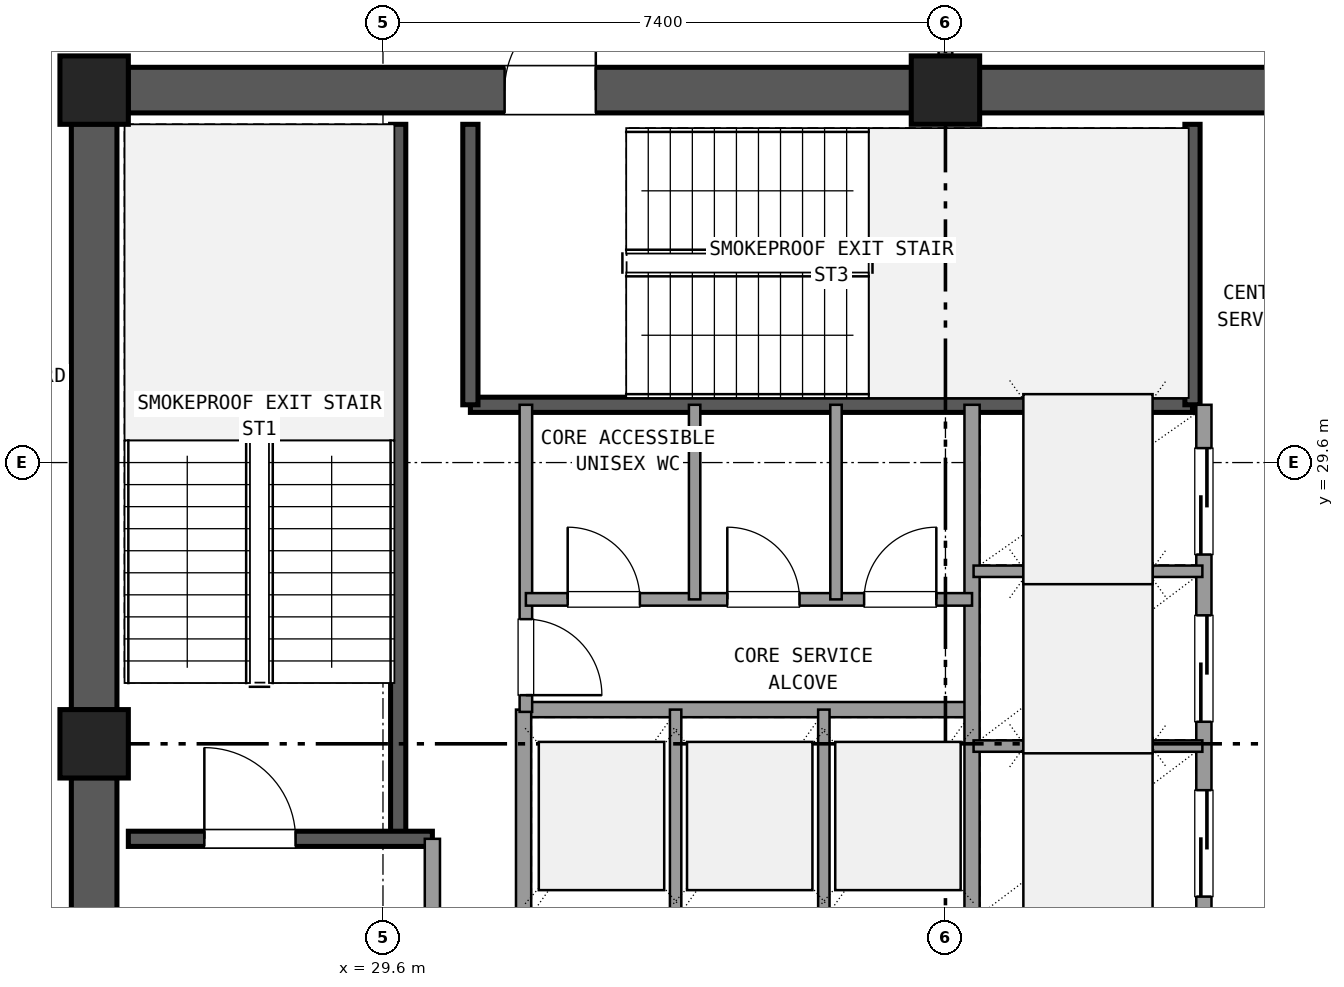
"""IFC4 building model, lengths in metres.
Left out: names, types, materials, properties, quantities, classifications, styles, units other than length and angle.
Written with IfcOpenShell. Run it as: python <this file> out.ifc"""

import sys

from ifc_helpers import new_model, si_unit, direction, frame, frame_2d, origin, origin_2d, place, context, subcontext, project, spatial, rectangle, extrude, element, fill, save


model = new_model("IFC4")
c1 = context("Model", 3, precision=1e-05, world=origin(), true_north=direction((0.0, 1.0)))
c2 = subcontext(c1, "Body", "Model", "MODEL_VIEW")
j1 = project(units=[si_unit("LENGTHUNIT", "METRE"), si_unit("PLANEANGLEUNIT", "RADIAN")], contexts=[c1])
p1 = place(None, origin())
s1 = spatial("IfcSite", under=j1, at=p1, CompositionType="ELEMENT")
p2 = place(p1, origin())
s2 = spatial("IfcBuilding", under=s1, at=p2, CompositionType="ELEMENT")
p3 = place(p2, frame((0.0, 0.0, 188.46)))
s3 = spatial("IfcBuildingStorey", under=s2, at=p3, CompositionType="ELEMENT", Elevation=188.46)
for number, where, z_axis, x_axis in (
    (1, (37.0, 34.5, 0.0), (0.0, 0.0, 1.0), (1.0, 0.0, 0.0)),
    (2, (25.8, 34.5, 0.0), (0.0, 0.0, 1.0), (1.0, 0.0, 0.0)),
    (3, (25.8, 25.9, 0.0), (0.0, 0.0, 1.0), (1.0, 0.0, 0.0)),
):
    element("IfcColumn", number, at=place(p3, frame(where, z_axis=z_axis, x_axis=x_axis)), inside=s3, PredefinedType="COLUMN", context=c2, shape_type="SweptSolid", body=[
        extrude(rectangle(XDim=0.9, YDim=0.9, at=origin_2d()), origin(), (0.0, 0.0, 1.0), 4.32),
    ])
p4 = place(p3, frame((47.755, 34.5, 0.0), z_axis=(0.0, 0.0, 1.0), x_axis=(-1.0, 0.0, 0.0)))
e4 = element("IfcWall", 4, at=p4, inside=s3, PredefinedType="SHEAR", context=c2, shape_type="SweptSolid", body=[
    extrude(rectangle(XDim=10.31, YDim=0.6, at=frame_2d((5.155, 0.0))), origin(), (0.0, 0.0, 1.0), 4.04),
])
p5 = place(p4, frame((4.655, 0.0, 0.0)))
e5 = element("IfcOpeningElement", 5, at=p5, cuts=e4, PredefinedType="OPENING", context=c2, shape_type="SweptSolid", body=[
    extrude(rectangle(XDim=1.6, YDim=2.2, at=frame_2d((0.8, 1.1))), frame((0.0, 0.31, 0.0), z_axis=(0.0, -1.0, 0.0), x_axis=(1.0, 0.0, 0.0)), (0.0, 0.0, 1.0), 0.62),
])
p6 = place(p3, frame((36.555, 34.5, 0.0), z_axis=(0.0, 0.0, 1.0), x_axis=(-1.0, 0.0, 0.0)))
e6 = element("IfcWall", 6, at=p6, inside=s3, PredefinedType="SHEAR", context=c2, shape_type="SweptSolid", body=[
    extrude(rectangle(XDim=10.31, YDim=0.6, at=frame_2d((5.155, 0.0))), origin(), (0.0, 0.0, 1.0), 4.04),
])
p7 = place(p6, frame((4.155, 0.0, 0.0)))
e7 = element("IfcOpeningElement", 7, at=p7, cuts=e6, PredefinedType="OPENING", context=c2, shape_type="SweptSolid", body=[
    extrude(rectangle(XDim=1.2, YDim=2.15, at=frame_2d((0.6, 1.075))), frame((0.0, 0.31, 0.0), z_axis=(0.0, -1.0, 0.0), x_axis=(1.0, 0.0, 0.0)), (0.0, 0.0, 1.0), 0.62),
])
p8 = place(p3, frame((25.8, 34.055, 0.0), z_axis=(0.0, 0.0, 1.0), x_axis=(0.0, -1.0, 0.0)))
e8 = element("IfcWall", 8, at=p8, inside=s3, PredefinedType="SHEAR", context=c2, shape_type="SweptSolid", body=[
    extrude(rectangle(XDim=7.71, YDim=0.6, at=frame_2d((3.855, 0.0))), origin(), (0.0, 0.0, 1.0), 4.04),
])
p9 = place(p3, frame((25.8, 25.455, 0.0), z_axis=(0.0, 0.0, 1.0), x_axis=(0.0, -1.0, 0.0)))
e9 = element("IfcWall", 9, at=p9, inside=s3, PredefinedType="SHEAR", context=c2, shape_type="SweptSolid", body=[
    extrude(rectangle(XDim=7.71, YDim=0.6, at=frame_2d((3.855, 0.0))), origin(), (0.0, 0.0, 1.0), 4.04),
])
p10 = place(p9, frame((2.205, 0.0, 0.0)))
e10 = element("IfcOpeningElement", 10, at=p10, cuts=e9, PredefinedType="OPENING", context=c2, shape_type="SweptSolid", body=[
    extrude(rectangle(XDim=1.2, YDim=2.15, at=frame_2d((0.6, 1.075))), frame((0.0, 0.31, 0.0), z_axis=(0.0, -1.0, 0.0), x_axis=(1.0, 0.0, 0.0)), (0.0, 0.0, 1.0), 0.62),
])
p11 = place(p3, frame((29.8, 24.65, 0.0), z_axis=(0.0, 0.0, 1.0), x_axis=(0.0, 1.0, 0.0)))
e11 = element("IfcWall", 11, at=p11, inside=s3, PredefinedType="SHEAR", context=c2, shape_type="SweptSolid", body=[
    extrude(rectangle(XDim=9.4, YDim=0.2, at=frame_2d((4.7, 0.0))), origin(), (0.0, 0.0, 1.0), 4.04),
])
p12 = place(p3, frame((26.25, 24.65, 0.0), z_axis=(0.0, 0.0, 1.0), x_axis=(1.0, 0.0, 0.0)))
e12 = element("IfcWall", 12, at=p12, inside=s3, PredefinedType="SHEAR", context=c2, shape_type="SweptSolid", body=[
    extrude(rectangle(XDim=4.0, YDim=0.2, at=frame_2d((2.0, 0.0))), origin(), (0.0, 0.0, 1.0), 4.04),
])
p13 = place(p12, frame((1.0, 0.0, 0.0)))
e13 = element("IfcOpeningElement", 13, at=p13, cuts=e12, PredefinedType="OPENING", context=c2, shape_type="SweptSolid", body=[
    extrude(rectangle(XDim=1.2, YDim=2.15, at=frame_2d((0.6, 1.075))), frame((0.0, 0.11, 0.0), z_axis=(0.0, -1.0, 0.0), x_axis=(1.0, 0.0, 0.0)), (0.0, 0.0, 1.0), 0.22),
])
p14 = place(p3, frame((30.75, 30.36, 0.0), z_axis=(0.0, 0.0, 1.0), x_axis=(1.0, 0.0, 0.0)))
e14 = element("IfcWall", 14, at=p14, inside=s3, PredefinedType="SHEAR", context=c2, shape_type="SweptSolid", body=[
    extrude(rectangle(XDim=9.5, YDim=0.2, at=frame_2d((4.75, 0.0))), origin(), (0.0, 0.0, 1.0), 4.04),
])
for number, where, z_axis, x_axis in (
    (15, (30.75, 30.36, 0.0), (0.0, 0.0, 1.0), (0.0, 1.0, 0.0)),
    (16, (40.25, 30.36, 0.0), (0.0, 0.0, 1.0), (0.0, 1.0, 0.0)),
):
    element("IfcWall", number, at=place(p3, frame(where, z_axis=z_axis, x_axis=x_axis)), inside=s3, PredefinedType="SHEAR", context=c2, shape_type="SweptSolid", body=[
        extrude(rectangle(XDim=3.69, YDim=0.2, at=frame_2d((1.845, 0.0))), origin(), (0.0, 0.0, 1.0), 4.04),
    ])
p15 = place(p3, frame((30.25, 17.75, 0.0), z_axis=(0.0, 0.0, 1.0), x_axis=(0.0, 1.0, 0.0)))
e17 = element("IfcWall", 17, at=p15, inside=s3, PredefinedType="SOLIDWALL", context=c2, shape_type="SweptSolid", body=[
    extrude(rectangle(XDim=6.9, YDim=0.2, at=frame_2d((3.45, 0.0))), origin(), (0.0, 0.0, 1.0), 2.95),
])
p16 = place(p15, frame((4.15, 0.0, 0.0)))
e18 = element("IfcOpeningElement", 18, at=p16, cuts=e17, PredefinedType="OPENING", context=c2, shape_type="SweptSolid", body=[
    extrude(rectangle(XDim=1.2, YDim=2.15, at=frame_2d((0.6, 1.075))), frame((0.0, 0.11, 0.0), z_axis=(0.0, -1.0, 0.0), x_axis=(1.0, 0.0, 0.0)), (0.0, 0.0, 1.0), 0.22),
])
p17 = place(p3, frame((31.45, 26.35, 0.0), z_axis=(0.0, 0.0, 1.0), x_axis=(1.0, 0.0, 0.0)))
e19 = element("IfcWall", 19, at=p17, inside=s3, PredefinedType="SOLIDWALL", context=c2, shape_type="SweptSolid", body=[
    extrude(rectangle(XDim=5.9, YDim=0.2, at=frame_2d((2.95, 0.0))), origin(), (0.0, 0.0, 1.0), 2.95),
])
p18 = place(p3, frame((31.45, 23.54, 0.0), z_axis=(0.0, 0.0, 1.0), x_axis=(0.0, 1.0, 0.0)))
e20 = element("IfcWall", 20, at=p18, inside=s3, PredefinedType="SOLIDWALL", context=c2, shape_type="SweptSolid", body=[
    extrude(rectangle(XDim=2.81, YDim=0.2, at=frame_2d((1.405, 0.0))), origin(), (0.0, 0.0, 1.0), 2.95),
])
for number, where, z_axis, x_axis in (
    (21, (33.45, 23.54, 0.0), (0.0, 0.0, 1.0), (0.0, 1.0, 0.0)),
    (22, (35.4, 23.54, 0.0), (0.0, 0.0, 1.0), (0.0, 1.0, 0.0)),
):
    element("IfcWall", number, at=place(p3, frame(where, z_axis=z_axis, x_axis=x_axis)), inside=s3, PredefinedType="PARTITIONING", context=c2, shape_type="SweptSolid", body=[
        extrude(rectangle(XDim=2.81, YDim=0.15, at=frame_2d((1.405, 0.0))), origin(), (0.0, 0.0, 1.0), 2.95),
    ])
p19 = place(p3, frame((37.35, 23.54, 0.0), z_axis=(0.0, 0.0, 1.0), x_axis=(0.0, 1.0, 0.0)))
e23 = element("IfcWall", 23, at=p19, inside=s3, PredefinedType="SOLIDWALL", context=c2, shape_type="SweptSolid", body=[
    extrude(rectangle(XDim=6.82, YDim=0.2, at=frame_2d((3.41, 0.0))), origin(), (0.0, 0.0, 1.0), 2.95),
])
p20 = place(p3, frame((40.4, 23.54, 0.0), z_axis=(0.0, 0.0, 1.0), x_axis=(0.0, 1.0, 0.0)))
e24 = element("IfcWall", 24, at=p20, inside=s3, PredefinedType="SOLIDWALL", context=c2, shape_type="SweptSolid", body=[
    extrude(rectangle(XDim=6.82, YDim=0.2, at=frame_2d((3.41, 0.0))), origin(), (0.0, 0.0, 1.0), 2.95),
])
p21 = place(p20, frame((0.35, 0.0, 0.0)))
e25 = element("IfcOpeningElement", 25, at=p21, cuts=e24, PredefinedType="OPENING", context=c2, shape_type="SweptSolid", body=[
    extrude(rectangle(XDim=1.4, YDim=2.2, at=frame_2d((0.7, 1.1))), frame((0.0, 0.11, 0.0), z_axis=(0.0, -1.0, 0.0), x_axis=(1.0, 0.0, 0.0)), (0.0, 0.0, 1.0), 0.22),
])
p22 = place(p20, frame((2.65, 0.0, 0.0)))
e26 = element("IfcOpeningElement", 26, at=p22, cuts=e24, PredefinedType="OPENING", context=c2, shape_type="SweptSolid", body=[
    extrude(rectangle(XDim=1.4, YDim=2.2, at=frame_2d((0.7, 1.1))), frame((0.0, 0.11, 0.0), z_axis=(0.0, -1.0, 0.0), x_axis=(1.0, 0.0, 0.0)), (0.0, 0.0, 1.0), 0.22),
])
p23 = place(p20, frame((4.85, 0.0, 0.0)))
e27 = element("IfcOpeningElement", 27, at=p23, cuts=e24, PredefinedType="OPENING", context=c2, shape_type="SweptSolid", body=[
    extrude(rectangle(XDim=1.4, YDim=2.2, at=frame_2d((0.7, 1.1))), frame((0.0, 0.11, 0.0), z_axis=(0.0, -1.0, 0.0), x_axis=(1.0, 0.0, 0.0)), (0.0, 0.0, 1.0), 0.22),
])
for number, where, z_axis, x_axis in (
    (28, (37.37, 25.87, 0.0), (0.0, 0.0, 1.0), (1.0, 0.0, 0.0)),
    (29, (37.37, 28.17, 0.0), (0.0, 0.0, 1.0), (1.0, 0.0, 0.0)),
):
    element("IfcWall", number, at=place(p3, frame(where, z_axis=z_axis, x_axis=x_axis)), inside=s3, PredefinedType="PARTITIONING", context=c2, shape_type="SweptSolid", body=[
        extrude(rectangle(XDim=3.01, YDim=0.15, at=frame_2d((1.505, 0.0))), origin(), (0.0, 0.0, 1.0), 2.95),
    ])
p24 = place(p3, frame((31.48, 26.32, 0.0), z_axis=(0.0, 0.0, 1.0), x_axis=(0.0, 1.0, 0.0)))
e30 = element("IfcWall", 30, at=p24, inside=s3, PredefinedType="PLUMBINGWALL", context=c2, shape_type="SweptSolid", body=[
    extrude(rectangle(XDim=4.04, YDim=0.165, at=frame_2d((2.02, 0.0))), origin(), (0.0, 0.0, 1.0), 2.95),
])
p25 = place(p24, frame((0.22, 0.0, 0.0)))
e31 = element("IfcOpeningElement", 31, at=p25, cuts=e30, PredefinedType="OPENING", context=c2, shape_type="SweptSolid", body=[
    extrude(rectangle(XDim=1.0, YDim=2.15, at=frame_2d((0.5, 1.075))), frame((0.0, 0.093, 0.0), z_axis=(0.0, -1.0, 0.0), x_axis=(1.0, 0.0, 0.0)), (0.0, 0.0, 1.0), 0.185),
])
p26 = place(p3, frame((31.48, 27.8, 0.0), z_axis=(0.0, 0.0, 1.0), x_axis=(1.0, 0.0, 0.0)))
e32 = element("IfcWall", 32, at=p26, inside=s3, PredefinedType="PLUMBINGWALL", context=c2, shape_type="SweptSolid", body=[
    extrude(rectangle(XDim=5.87, YDim=0.165, at=frame_2d((2.935, 0.0))), origin(), (0.0, 0.0, 1.0), 2.95),
])
p27 = place(p26, frame((0.55, 0.0, 0.0)))
e33 = element("IfcOpeningElement", 33, at=p27, cuts=e32, PredefinedType="OPENING", context=c2, shape_type="SweptSolid", body=[
    extrude(rectangle(XDim=0.95, YDim=2.1, at=frame_2d((0.475, 1.05))), frame((0.0, 0.093, 0.0), z_axis=(0.0, -1.0, 0.0), x_axis=(1.0, 0.0, 0.0)), (0.0, 0.0, 1.0), 0.185),
])
p28 = place(p26, frame((2.65, 0.0, 0.0)))
e34 = element("IfcOpeningElement", 34, at=p28, cuts=e32, PredefinedType="OPENING", context=c2, shape_type="SweptSolid", body=[
    extrude(rectangle(XDim=0.95, YDim=2.1, at=frame_2d((0.475, 1.05))), frame((0.0, 0.093, 0.0), z_axis=(0.0, -1.0, 0.0), x_axis=(1.0, 0.0, 0.0)), (0.0, 0.0, 1.0), 0.185),
])
p29 = place(p26, frame((4.45, 0.0, 0.0)))
e35 = element("IfcOpeningElement", 35, at=p29, cuts=e32, PredefinedType="OPENING", context=c2, shape_type="SweptSolid", body=[
    extrude(rectangle(XDim=0.95, YDim=2.1, at=frame_2d((0.475, 1.05))), frame((0.0, 0.093, 0.0), z_axis=(0.0, -1.0, 0.0), x_axis=(1.0, 0.0, 0.0)), (0.0, 0.0, 1.0), 0.185),
])
for number, where, z_axis, x_axis in (
    (36, (33.7, 27.8, 0.0), (0.0, 0.0, 1.0), (0.0, 1.0, 0.0)),
    (37, (35.56, 27.8, 0.0), (0.0, 0.0, 1.0), (0.0, 1.0, 0.0)),
):
    element("IfcWall", number, at=place(p3, frame(where, z_axis=z_axis, x_axis=x_axis)), inside=s3, PredefinedType="PARTITIONING", context=c2, shape_type="SweptSolid", body=[
        extrude(rectangle(XDim=2.56, YDim=0.15, at=frame_2d((1.28, 0.0))), origin(), (0.0, 0.0, 1.0), 2.95),
    ])
p30 = place(p3, frame((37.0, 34.95, 0.0), z_axis=(0.0, 0.0, 1.0), x_axis=(0.0, 1.0, 0.0)))
e38 = element("IfcWall", 38, at=p30, inside=s3, PredefinedType="PARTITIONING", context=c2, shape_type="SweptSolid", body=[
    extrude(rectangle(XDim=2.7, YDim=0.18, at=frame_2d((1.35, 0.0))), origin(), (0.0, 0.0, 1.0), 2.95),
])
p31 = place(p30, frame((0.35, 0.0, 0.0)))
e39 = element("IfcOpeningElement", 39, at=p31, cuts=e38, PredefinedType="OPENING", context=c2, shape_type="SweptSolid", body=[
    extrude(rectangle(XDim=2.0, YDim=2.2, at=frame_2d((1.0, 1.1))), frame((0.0, 0.1, 0.0), z_axis=(0.0, -1.0, 0.0), x_axis=(1.0, 0.0, 0.0)), (0.0, 0.0, 1.0), 0.2),
])
p32 = place(p13, origin())
e40 = element("IfcDoor", 40, at=p32, inside=s3, OperationType="SINGLE_SWING_LEFT", PredefinedType="DOOR", context=c2, shape_type="SweptSolid", body=[
    extrude(rectangle(XDim=1.2, YDim=2.15, at=frame_2d((0.6, 1.075))), frame((0.0, 0.025, 0.0), z_axis=(0.0, -1.0, 0.0), x_axis=(1.0, 0.0, 0.0)), (0.0, 0.0, 1.0), 0.05),
])
fill(e13, e40)
p33 = place(p7, frame((1.2, 0.0, 0.0), z_axis=(0.0, 0.0, 1.0), x_axis=(-1.0, 0.0, 0.0)))
e41 = element("IfcDoor", 41, at=p33, inside=s3, OperationType="SINGLE_SWING_LEFT", PredefinedType="DOOR", context=c2, shape_type="SweptSolid", body=[
    extrude(rectangle(XDim=1.2, YDim=2.15, at=frame_2d((0.6, 1.075))), frame((0.0, 0.025, 0.0), z_axis=(0.0, -1.0, 0.0), x_axis=(1.0, 0.0, 0.0)), (0.0, 0.0, 1.0), 0.05),
])
fill(e7, e41)
p34 = place(p21, origin())
e42 = element("IfcDoor", 42, at=p34, inside=s3, OperationType="SLIDING_TO_LEFT", PredefinedType="DOOR", context=c2, shape_type="SweptSolid", body=[
    extrude(rectangle(XDim=1.4, YDim=2.2, at=frame_2d((0.7, 1.1))), frame((0.0, 0.025, 0.0), z_axis=(0.0, -1.0, 0.0), x_axis=(1.0, 0.0, 0.0)), (0.0, 0.0, 1.0), 0.05),
])
fill(e25, e42)
p35 = place(p22, origin())
e43 = element("IfcDoor", 43, at=p35, inside=s3, OperationType="SLIDING_TO_LEFT", PredefinedType="DOOR", context=c2, shape_type="SweptSolid", body=[
    extrude(rectangle(XDim=1.4, YDim=2.2, at=frame_2d((0.7, 1.1))), frame((0.0, 0.025, 0.0), z_axis=(0.0, -1.0, 0.0), x_axis=(1.0, 0.0, 0.0)), (0.0, 0.0, 1.0), 0.05),
])
fill(e26, e43)
p36 = place(p23, origin())
e44 = element("IfcDoor", 44, at=p36, inside=s3, OperationType="SLIDING_TO_RIGHT", PredefinedType="DOOR", context=c2, shape_type="SweptSolid", body=[
    extrude(rectangle(XDim=1.4, YDim=2.2, at=frame_2d((0.7, 1.1))), frame((0.0, 0.025, 0.0), z_axis=(0.0, -1.0, 0.0), x_axis=(1.0, 0.0, 0.0)), (0.0, 0.0, 1.0), 0.05),
])
fill(e27, e44)
p37 = place(p25, frame((1.0, 0.0, 0.0), z_axis=(0.0, 0.0, 1.0), x_axis=(-1.0, 0.0, 0.0)))
e45 = element("IfcDoor", 45, at=p37, inside=s3, OperationType="SINGLE_SWING_LEFT", PredefinedType="DOOR", context=c2, shape_type="SweptSolid", body=[
    extrude(rectangle(XDim=1.0, YDim=2.15, at=frame_2d((0.5, 1.075))), frame((0.0, 0.025, 0.0), z_axis=(0.0, -1.0, 0.0), x_axis=(1.0, 0.0, 0.0)), (0.0, 0.0, 1.0), 0.05),
])
fill(e31, e45)
p38 = place(p27, origin())
e46 = element("IfcDoor", 46, at=p38, inside=s3, OperationType="SINGLE_SWING_LEFT", PredefinedType="DOOR", context=c2, shape_type="SweptSolid", body=[
    extrude(rectangle(XDim=0.95, YDim=2.1, at=frame_2d((0.475, 1.05))), frame((0.0, 0.025, 0.0), z_axis=(0.0, -1.0, 0.0), x_axis=(1.0, 0.0, 0.0)), (0.0, 0.0, 1.0), 0.05),
])
fill(e33, e46)
p39 = place(p28, origin())
e47 = element("IfcDoor", 47, at=p39, inside=s3, OperationType="SINGLE_SWING_LEFT", PredefinedType="DOOR", context=c2, shape_type="SweptSolid", body=[
    extrude(rectangle(XDim=0.95, YDim=2.1, at=frame_2d((0.475, 1.05))), frame((0.0, 0.025, 0.0), z_axis=(0.0, -1.0, 0.0), x_axis=(1.0, 0.0, 0.0)), (0.0, 0.0, 1.0), 0.05),
])
fill(e34, e47)
p40 = place(p29, origin())
e48 = element("IfcDoor", 48, at=p40, inside=s3, OperationType="SINGLE_SWING_RIGHT", PredefinedType="DOOR", context=c2, shape_type="SweptSolid", body=[
    extrude(rectangle(XDim=0.95, YDim=2.1, at=frame_2d((0.475, 1.05))), frame((0.0, 0.025, 0.0), z_axis=(0.0, -1.0, 0.0), x_axis=(1.0, 0.0, 0.0)), (0.0, 0.0, 1.0), 0.05),
])
fill(e35, e48)
save(model, sys.argv[1])
